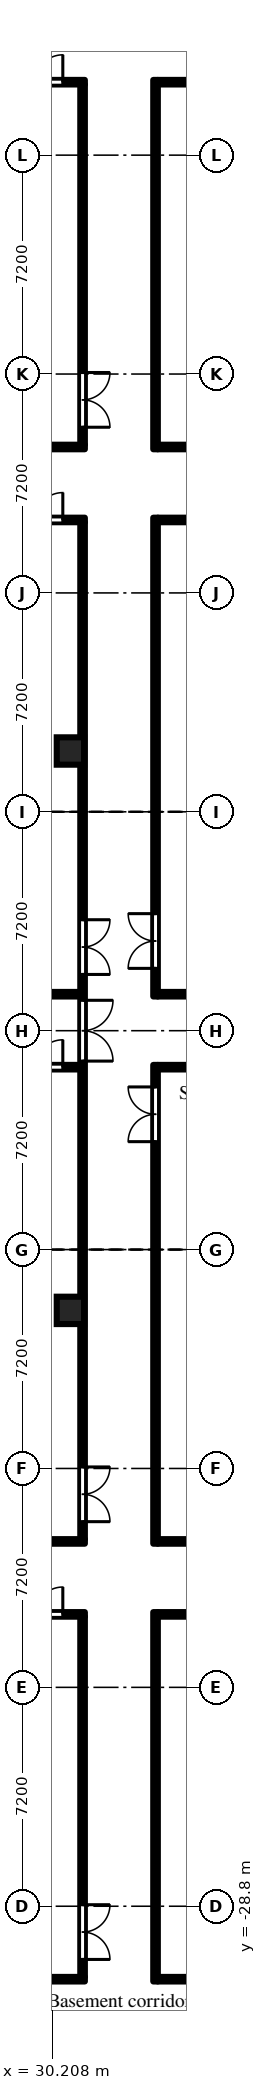
"""IFC4 building model, lengths in metres.
Left out: names, types, materials, properties, quantities, classifications, styles, units other than length and angle.
Written with IfcOpenShell. Run it as: python <this file> out.ifc"""

import sys

from ifc_helpers import new_model, si_unit, direction, frame, frame_2d, origin, origin_2d, place, context, subcontext, project, spatial, rectangle, extrude, element, fill, save


model = new_model("IFC4")
c1 = context("Model", 3, precision=1e-05, world=origin(), true_north=direction((0.0, 1.0)))
c2 = subcontext(c1, "Body", "Model", "MODEL_VIEW")
j1 = project(units=[si_unit("LENGTHUNIT", "METRE"), si_unit("PLANEANGLEUNIT", "RADIAN")], contexts=[c1])
p1 = place(None, origin())
s1 = spatial("IfcSite", under=j1, at=p1, CompositionType="ELEMENT")
p2 = place(p1, origin())
s2 = spatial("IfcBuilding", under=s1, at=p2, CompositionType="ELEMENT")
p3 = place(p2, frame((0.0, 0.0, -4.8)))
s3 = spatial("IfcBuildingStorey", under=s2, at=p3, CompositionType="ELEMENT", Elevation=-4.8)
for number, where, z_axis, x_axis in (
    (1, (30.8, -9.2, -0.5), (0.0, 0.0, 1.0), (1.0, 0.0, 0.0)),
    (2, (30.8, 9.2, -0.5), (0.0, 0.0, 1.0), (1.0, 0.0, 0.0)),
):
    element("IfcColumn", number, at=place(p3, frame(where, z_axis=z_axis, x_axis=x_axis)), inside=s3, PredefinedType="COLUMN", context=c2, shape_type="SweptSolid", body=[
        extrude(rectangle(XDim=0.9, YDim=0.9, at=origin_2d()), origin(), (0.0, 0.0, 1.0), 5.3),
    ])
p4 = place(p3, frame((18.675, -31.2, 0.0), z_axis=(0.0, 0.0, 1.0), x_axis=(1.0, 0.0, 0.0)))
e3 = element("IfcWall", 3, at=p4, inside=s3, PredefinedType="PARTITIONING", context=c2, shape_type="SweptSolid", body=[
    extrude(rectangle(XDim=12.6, YDim=0.15, at=frame_2d((6.3, 0.0))), origin(), (0.0, 0.0, 1.0), 4.35),
])
p5 = place(p4, frame((0.575, 0.0, 0.0)))
e4 = element("IfcOpeningElement", 4, at=p5, cuts=e3, PredefinedType="OPENING", context=c2, shape_type="SweptSolid", body=[
    extrude(rectangle(XDim=1.8, YDim=2.1, at=frame_2d((0.9, 1.05))), frame((0.0, 0.085, 0.0), z_axis=(0.0, -1.0, 0.0), x_axis=(1.0, 0.0, 0.0)), (0.0, 0.0, 1.0), 0.17),
])
p6 = place(p3, frame((18.675, -19.2, 0.0), z_axis=(0.0, 0.0, 1.0), x_axis=(1.0, 0.0, 0.0)))
e5 = element("IfcWall", 5, at=p6, inside=s3, PredefinedType="PARTITIONING", context=c2, shape_type="SweptSolid", body=[
    extrude(rectangle(XDim=12.6, YDim=0.15, at=frame_2d((6.3, 0.0))), origin(), (0.0, 0.0, 1.0), 4.35),
])
p7 = place(p6, frame((10.075, 0.0, 0.0)))
e6 = element("IfcOpeningElement", 6, at=p7, cuts=e5, PredefinedType="OPENING", context=c2, shape_type="SweptSolid", body=[
    extrude(rectangle(XDim=1.8, YDim=2.1, at=frame_2d((0.9, 1.05))), frame((0.0, 0.085, 0.0), z_axis=(0.0, -1.0, 0.0), x_axis=(1.0, 0.0, 0.0)), (0.0, 0.0, 1.0), 0.17),
])
p8 = place(p3, frame((18.675, -16.8, 0.0), z_axis=(0.0, 0.0, 1.0), x_axis=(1.0, 0.0, 0.0)))
e7 = element("IfcWall", 7, at=p8, inside=s3, PredefinedType="PARTITIONING", context=c2, shape_type="SweptSolid", body=[
    extrude(rectangle(XDim=12.6, YDim=0.15, at=frame_2d((6.3, 0.0))), origin(), (0.0, 0.0, 1.0), 4.35),
])
p9 = place(p8, frame((0.575, 0.0, 0.0)))
e8 = element("IfcOpeningElement", 8, at=p9, cuts=e7, PredefinedType="OPENING", context=c2, shape_type="SweptSolid", body=[
    extrude(rectangle(XDim=1.8, YDim=2.1, at=frame_2d((0.9, 1.05))), frame((0.0, 0.085, 0.0), z_axis=(0.0, -1.0, 0.0), x_axis=(1.0, 0.0, 0.0)), (0.0, 0.0, 1.0), 0.17),
])
p10 = place(p3, frame((18.675, 16.8, 0.0), z_axis=(0.0, 0.0, 1.0), x_axis=(1.0, 0.0, 0.0)))
e9 = element("IfcWall", 9, at=p10, inside=s3, PredefinedType="PARTITIONING", context=c2, shape_type="SweptSolid", body=[
    extrude(rectangle(XDim=12.6, YDim=0.15, at=frame_2d((6.3, 0.0))), origin(), (0.0, 0.0, 1.0), 4.35),
])
p11 = place(p10, frame((10.075, 0.0, 0.0)))
e10 = element("IfcOpeningElement", 10, at=p11, cuts=e9, PredefinedType="OPENING", context=c2, shape_type="SweptSolid", body=[
    extrude(rectangle(XDim=1.8, YDim=2.1, at=frame_2d((0.9, 1.05))), frame((0.0, 0.085, 0.0), z_axis=(0.0, -1.0, 0.0), x_axis=(1.0, 0.0, 0.0)), (0.0, 0.0, 1.0), 0.17),
])
p12 = place(p3, frame((18.675, 19.2, 0.0), z_axis=(0.0, 0.0, 1.0), x_axis=(1.0, 0.0, 0.0)))
e11 = element("IfcWall", 11, at=p12, inside=s3, PredefinedType="PARTITIONING", context=c2, shape_type="SweptSolid", body=[
    extrude(rectangle(XDim=12.6, YDim=0.15, at=frame_2d((6.3, 0.0))), origin(), (0.0, 0.0, 1.0), 4.35),
])
p13 = place(p12, frame((0.575, 0.0, 0.0)))
e12 = element("IfcOpeningElement", 12, at=p13, cuts=e11, PredefinedType="OPENING", context=c2, shape_type="SweptSolid", body=[
    extrude(rectangle(XDim=1.8, YDim=2.1, at=frame_2d((0.9, 1.05))), frame((0.0, 0.085, 0.0), z_axis=(0.0, -1.0, 0.0), x_axis=(1.0, 0.0, 0.0)), (0.0, 0.0, 1.0), 0.17),
])
p14 = place(p3, frame((18.675, 31.2, 0.0), z_axis=(0.0, 0.0, 1.0), x_axis=(1.0, 0.0, 0.0)))
e13 = element("IfcWall", 13, at=p14, inside=s3, PredefinedType="PARTITIONING", context=c2, shape_type="SweptSolid", body=[
    extrude(rectangle(XDim=12.6, YDim=0.15, at=frame_2d((6.3, 0.0))), origin(), (0.0, 0.0, 1.0), 4.35),
])
p15 = place(p14, frame((10.075, 0.0, 0.0)))
e14 = element("IfcOpeningElement", 14, at=p15, cuts=e13, PredefinedType="OPENING", context=c2, shape_type="SweptSolid", body=[
    extrude(rectangle(XDim=1.8, YDim=2.1, at=frame_2d((0.9, 1.05))), frame((0.0, 0.085, 0.0), z_axis=(0.0, -1.0, 0.0), x_axis=(1.0, 0.0, 0.0)), (0.0, 0.0, 1.0), 0.17),
])
p16 = place(p3, frame((21.6, -1.2, 0.0), z_axis=(0.0, 0.0, 1.0), x_axis=(1.0, 0.0, 0.0)))
e15 = element("IfcWall", 15, at=p16, inside=s3, PredefinedType="PARTITIONING", context=c2, shape_type="SweptSolid", body=[
    extrude(rectangle(XDim=9.525, YDim=0.15, at=frame_2d((4.762, 0.0))), origin(), (0.0, 0.0, 1.0), 4.35),
])
p17 = place(p16, frame((0.85, 0.0, 0.0)))
e16 = element("IfcOpeningElement", 16, at=p17, cuts=e15, PredefinedType="OPENING", context=c2, shape_type="SweptSolid", body=[
    extrude(rectangle(XDim=1.8, YDim=2.1, at=frame_2d((0.9, 1.05))), frame((0.0, 0.085, 0.0), z_axis=(0.0, -1.0, 0.0), x_axis=(1.0, 0.0, 0.0)), (0.0, 0.0, 1.0), 0.17),
])
p18 = place(p16, frame((7.15, 0.0, 0.0)))
e17 = element("IfcOpeningElement", 17, at=p18, cuts=e15, PredefinedType="OPENING", context=c2, shape_type="SweptSolid", body=[
    extrude(rectangle(XDim=1.8, YDim=2.1, at=frame_2d((0.9, 1.05))), frame((0.0, 0.085, 0.0), z_axis=(0.0, -1.0, 0.0), x_axis=(1.0, 0.0, 0.0)), (0.0, 0.0, 1.0), 0.17),
])
p19 = place(p3, frame((21.6, 1.2, 0.0), z_axis=(0.0, 0.0, 1.0), x_axis=(1.0, 0.0, 0.0)))
e18 = element("IfcWall", 18, at=p19, inside=s3, PredefinedType="PARTITIONING", context=c2, shape_type="SweptSolid", body=[
    extrude(rectangle(XDim=9.525, YDim=0.15, at=frame_2d((4.762, 0.0))), origin(), (0.0, 0.0, 1.0), 4.35),
])
p20 = place(p19, frame((0.65, 0.0, 0.0)))
e19 = element("IfcOpeningElement", 19, at=p20, cuts=e18, PredefinedType="OPENING", context=c2, shape_type="SweptSolid", body=[
    extrude(rectangle(XDim=1.8, YDim=2.1, at=frame_2d((0.9, 1.05))), frame((0.0, 0.085, 0.0), z_axis=(0.0, -1.0, 0.0), x_axis=(1.0, 0.0, 0.0)), (0.0, 0.0, 1.0), 0.17),
])
p21 = place(p3, frame((31.2, -31.125, 0.0), z_axis=(0.0, 0.0, 1.0), x_axis=(0.0, 1.0, 0.0)))
e20 = element("IfcWall", 20, at=p21, inside=s3, PredefinedType="PARTITIONING", context=c2, shape_type="SweptSolid", body=[
    extrude(rectangle(XDim=11.85, YDim=0.15, at=frame_2d((5.925, 0.0))), origin(), (0.0, 0.0, 1.0), 4.35),
])
p22 = place(p21, frame((0.575, 0.0, 0.0)))
e21 = element("IfcOpeningElement", 21, at=p22, cuts=e20, PredefinedType="OPENING", context=c2, shape_type="SweptSolid", body=[
    extrude(rectangle(XDim=1.8, YDim=2.1, at=frame_2d((0.9, 1.05))), frame((0.0, 0.085, 0.0), z_axis=(0.0, -1.0, 0.0), x_axis=(1.0, 0.0, 0.0)), (0.0, 0.0, 1.0), 0.17),
])
p23 = place(p3, frame((31.2, -16.725, 0.0), z_axis=(0.0, 0.0, 1.0), x_axis=(0.0, 1.0, 0.0)))
e22 = element("IfcWall", 22, at=p23, inside=s3, PredefinedType="PARTITIONING", context=c2, shape_type="SweptSolid", body=[
    extrude(rectangle(XDim=33.45, YDim=0.15, at=frame_2d((16.725, 0.0))), origin(), (0.0, 0.0, 1.0), 4.35),
])
p24 = place(p23, frame((15.725, 0.0, 0.0)))
e23 = element("IfcOpeningElement", 23, at=p24, cuts=e22, PredefinedType="OPENING", context=c2, shape_type="SweptSolid", body=[
    extrude(rectangle(XDim=2.0, YDim=2.1, at=frame_2d((1.0, 1.05))), frame((0.0, 0.085, 0.0), z_axis=(0.0, -1.0, 0.0), x_axis=(1.0, 0.0, 0.0)), (0.0, 0.0, 1.0), 0.17),
])
p25 = place(p23, frame((18.575, 0.0, 0.0)))
e24 = element("IfcOpeningElement", 24, at=p25, cuts=e22, PredefinedType="OPENING", context=c2, shape_type="SweptSolid", body=[
    extrude(rectangle(XDim=1.8, YDim=2.1, at=frame_2d((0.9, 1.05))), frame((0.0, 0.085, 0.0), z_axis=(0.0, -1.0, 0.0), x_axis=(1.0, 0.0, 0.0)), (0.0, 0.0, 1.0), 0.17),
])
p26 = place(p23, frame((0.575, 0.0, 0.0)))
e25 = element("IfcOpeningElement", 25, at=p26, cuts=e22, PredefinedType="OPENING", context=c2, shape_type="SweptSolid", body=[
    extrude(rectangle(XDim=1.8, YDim=2.1, at=frame_2d((0.9, 1.05))), frame((0.0, 0.085, 0.0), z_axis=(0.0, -1.0, 0.0), x_axis=(1.0, 0.0, 0.0)), (0.0, 0.0, 1.0), 0.17),
])
p27 = place(p3, frame((31.2, 19.275, 0.0), z_axis=(0.0, 0.0, 1.0), x_axis=(0.0, 1.0, 0.0)))
e26 = element("IfcWall", 26, at=p27, inside=s3, PredefinedType="PARTITIONING", context=c2, shape_type="SweptSolid", body=[
    extrude(rectangle(XDim=11.85, YDim=0.15, at=frame_2d((5.925, 0.0))), origin(), (0.0, 0.0, 1.0), 4.35),
])
p28 = place(p27, frame((0.575, 0.0, 0.0)))
e27 = element("IfcOpeningElement", 27, at=p28, cuts=e26, PredefinedType="OPENING", context=c2, shape_type="SweptSolid", body=[
    extrude(rectangle(XDim=1.8, YDim=2.1, at=frame_2d((0.9, 1.05))), frame((0.0, 0.085, 0.0), z_axis=(0.0, -1.0, 0.0), x_axis=(1.0, 0.0, 0.0)), (0.0, 0.0, 1.0), 0.17),
])
p29 = place(p3, frame((33.6, -31.275, 0.0), z_axis=(0.0, 0.0, 1.0), x_axis=(0.0, 1.0, 0.0)))
e28 = element("IfcWall", 28, at=p29, inside=s3, PredefinedType="PARTITIONING", context=c2, shape_type="SweptSolid", body=[
    extrude(rectangle(XDim=12.15, YDim=0.15, at=frame_2d((6.075, 0.0))), origin(), (0.0, 0.0, 1.0), 4.35),
])
p30 = place(p3, frame((33.675, -31.2, 0.0), z_axis=(0.0, 0.0, 1.0), x_axis=(1.0, 0.0, 0.0)))
e29 = element("IfcWall", 29, at=p30, inside=s3, PredefinedType="PARTITIONING", context=c2, shape_type="SweptSolid", body=[
    extrude(rectangle(XDim=7.7, YDim=0.15, at=frame_2d((3.85, 0.0))), origin(), (0.0, 0.0, 1.0), 4.35),
])
p31 = place(p30, frame((2.375, 0.0, 0.0)))
e30 = element("IfcOpeningElement", 30, at=p31, cuts=e29, PredefinedType="OPENING", context=c2, shape_type="SweptSolid", body=[
    extrude(rectangle(XDim=1.8, YDim=2.1, at=frame_2d((0.9, 1.05))), frame((0.0, 0.085, 0.0), z_axis=(0.0, -1.0, 0.0), x_axis=(1.0, 0.0, 0.0)), (0.0, 0.0, 1.0), 0.17),
])
p32 = place(p3, frame((33.675, -19.2, 0.0), z_axis=(0.0, 0.0, 1.0), x_axis=(1.0, 0.0, 0.0)))
e31 = element("IfcWall", 31, at=p32, inside=s3, PredefinedType="PARTITIONING", context=c2, shape_type="SweptSolid", body=[
    extrude(rectangle(XDim=7.7, YDim=0.15, at=frame_2d((3.85, 0.0))), origin(), (0.0, 0.0, 1.0), 4.35),
])
p33 = place(p32, frame((3.375, 0.0, 0.0)))
e32 = element("IfcOpeningElement", 32, at=p33, cuts=e31, PredefinedType="OPENING", context=c2, shape_type="SweptSolid", body=[
    extrude(rectangle(XDim=1.8, YDim=2.1, at=frame_2d((0.9, 1.05))), frame((0.0, 0.085, 0.0), z_axis=(0.0, -1.0, 0.0), x_axis=(1.0, 0.0, 0.0)), (0.0, 0.0, 1.0), 0.17),
])
p34 = place(p3, frame((33.6, -16.875, 0.0), z_axis=(0.0, 0.0, 1.0), x_axis=(0.0, 1.0, 0.0)))
e33 = element("IfcWall", 33, at=p34, inside=s3, PredefinedType="PARTITIONING", context=c2, shape_type="SweptSolid", body=[
    extrude(rectangle(XDim=15.75, YDim=0.15, at=frame_2d((7.875, 0.0))), origin(), (0.0, 0.0, 1.0), 4.35),
])
p35 = place(p34, frame((13.225, 0.0, 0.0)))
e34 = element("IfcOpeningElement", 34, at=p35, cuts=e33, PredefinedType="OPENING", context=c2, shape_type="SweptSolid", body=[
    extrude(rectangle(XDim=1.8, YDim=2.1, at=frame_2d((0.9, 1.05))), frame((0.0, 0.085, 0.0), z_axis=(0.0, -1.0, 0.0), x_axis=(1.0, 0.0, 0.0)), (0.0, 0.0, 1.0), 0.17),
])
p36 = place(p3, frame((33.675, -16.8, 0.0), z_axis=(0.0, 0.0, 1.0), x_axis=(1.0, 0.0, 0.0)))
e35 = element("IfcWall", 35, at=p36, inside=s3, PredefinedType="PARTITIONING", context=c2, shape_type="SweptSolid", body=[
    extrude(rectangle(XDim=7.7, YDim=0.15, at=frame_2d((3.85, 0.0))), origin(), (0.0, 0.0, 1.0), 4.35),
])
p37 = place(p36, frame((2.375, 0.0, 0.0)))
e36 = element("IfcOpeningElement", 36, at=p37, cuts=e35, PredefinedType="OPENING", context=c2, shape_type="SweptSolid", body=[
    extrude(rectangle(XDim=1.8, YDim=2.1, at=frame_2d((0.9, 1.05))), frame((0.0, 0.085, 0.0), z_axis=(0.0, -1.0, 0.0), x_axis=(1.0, 0.0, 0.0)), (0.0, 0.0, 1.0), 0.17),
])
p38 = place(p3, frame((33.675, -1.2, 0.0), z_axis=(0.0, 0.0, 1.0), x_axis=(1.0, 0.0, 0.0)))
e37 = element("IfcWall", 37, at=p38, inside=s3, PredefinedType="PARTITIONING", context=c2, shape_type="SweptSolid", body=[
    extrude(rectangle(XDim=2.825, YDim=0.15, at=frame_2d((1.413, 0.0))), origin(), (0.0, 0.0, 1.0), 4.35),
])
p39 = place(p3, frame((33.6, 1.125, 0.0), z_axis=(0.0, 0.0, 1.0), x_axis=(0.0, 1.0, 0.0)))
e38 = element("IfcWall", 38, at=p39, inside=s3, PredefinedType="PARTITIONING", context=c2, shape_type="SweptSolid", body=[
    extrude(rectangle(XDim=15.75, YDim=0.15, at=frame_2d((7.875, 0.0))), origin(), (0.0, 0.0, 1.0), 4.35),
])
p40 = place(p39, frame((0.925, 0.0, 0.0)))
e39 = element("IfcOpeningElement", 39, at=p40, cuts=e38, PredefinedType="OPENING", context=c2, shape_type="SweptSolid", body=[
    extrude(rectangle(XDim=1.8, YDim=2.1, at=frame_2d((0.9, 1.05))), frame((0.0, 0.085, 0.0), z_axis=(0.0, -1.0, 0.0), x_axis=(1.0, 0.0, 0.0)), (0.0, 0.0, 1.0), 0.17),
])
p41 = place(p3, frame((33.675, 1.2, 0.0), z_axis=(0.0, 0.0, 1.0), x_axis=(1.0, 0.0, 0.0)))
e40 = element("IfcWall", 40, at=p41, inside=s3, PredefinedType="PARTITIONING", context=c2, shape_type="SweptSolid", body=[
    extrude(rectangle(XDim=2.825, YDim=0.15, at=frame_2d((1.413, 0.0))), origin(), (0.0, 0.0, 1.0), 4.35),
])
p42 = place(p3, frame((33.675, 16.8, 0.0), z_axis=(0.0, 0.0, 1.0), x_axis=(1.0, 0.0, 0.0)))
e41 = element("IfcWall", 41, at=p42, inside=s3, PredefinedType="PARTITIONING", context=c2, shape_type="SweptSolid", body=[
    extrude(rectangle(XDim=7.7, YDim=0.15, at=frame_2d((3.85, 0.0))), origin(), (0.0, 0.0, 1.0), 4.35),
])
p43 = place(p42, frame((3.375, 0.0, 0.0)))
e42 = element("IfcOpeningElement", 42, at=p43, cuts=e41, PredefinedType="OPENING", context=c2, shape_type="SweptSolid", body=[
    extrude(rectangle(XDim=1.8, YDim=2.1, at=frame_2d((0.9, 1.05))), frame((0.0, 0.085, 0.0), z_axis=(0.0, -1.0, 0.0), x_axis=(1.0, 0.0, 0.0)), (0.0, 0.0, 1.0), 0.17),
])
p44 = place(p3, frame((33.6, 19.125, 0.0), z_axis=(0.0, 0.0, 1.0), x_axis=(0.0, 1.0, 0.0)))
e43 = element("IfcWall", 43, at=p44, inside=s3, PredefinedType="PARTITIONING", context=c2, shape_type="SweptSolid", body=[
    extrude(rectangle(XDim=12.15, YDim=0.15, at=frame_2d((6.075, 0.0))), origin(), (0.0, 0.0, 1.0), 4.35),
])
p45 = place(p3, frame((33.675, 19.2, 0.0), z_axis=(0.0, 0.0, 1.0), x_axis=(1.0, 0.0, 0.0)))
e44 = element("IfcWall", 44, at=p45, inside=s3, PredefinedType="PARTITIONING", context=c2, shape_type="SweptSolid", body=[
    extrude(rectangle(XDim=7.7, YDim=0.15, at=frame_2d((3.85, 0.0))), origin(), (0.0, 0.0, 1.0), 4.35),
])
p46 = place(p45, frame((2.375, 0.0, 0.0)))
e45 = element("IfcOpeningElement", 45, at=p46, cuts=e44, PredefinedType="OPENING", context=c2, shape_type="SweptSolid", body=[
    extrude(rectangle(XDim=1.8, YDim=2.1, at=frame_2d((0.9, 1.05))), frame((0.0, 0.085, 0.0), z_axis=(0.0, -1.0, 0.0), x_axis=(1.0, 0.0, 0.0)), (0.0, 0.0, 1.0), 0.17),
])
p47 = place(p3, frame((33.675, 31.2, 0.0), z_axis=(0.0, 0.0, 1.0), x_axis=(1.0, 0.0, 0.0)))
e46 = element("IfcWall", 46, at=p47, inside=s3, PredefinedType="PARTITIONING", context=c2, shape_type="SweptSolid", body=[
    extrude(rectangle(XDim=7.7, YDim=0.15, at=frame_2d((3.85, 0.0))), origin(), (0.0, 0.0, 1.0), 4.35),
])
p48 = place(p47, frame((3.375, 0.0, 0.0)))
e47 = element("IfcOpeningElement", 47, at=p48, cuts=e46, PredefinedType="OPENING", context=c2, shape_type="SweptSolid", body=[
    extrude(rectangle(XDim=1.8, YDim=2.1, at=frame_2d((0.9, 1.05))), frame((0.0, 0.085, 0.0), z_axis=(0.0, -1.0, 0.0), x_axis=(1.0, 0.0, 0.0)), (0.0, 0.0, 1.0), 0.17),
])
p49 = place(p24, frame((2.0, 0.0, 0.0), z_axis=(0.0, 0.0, 1.0), x_axis=(-1.0, 0.0, 0.0)))
e48 = element("IfcDoor", 48, at=p49, inside=s3, OperationType="DOUBLE_DOOR_DOUBLE_SWING", PredefinedType="DOOR", context=c2, shape_type="SweptSolid", body=[
    extrude(rectangle(XDim=2.0, YDim=2.1, at=frame_2d((1.0, 1.05))), frame((0.0, 0.025, 0.0), z_axis=(0.0, -1.0, 0.0), x_axis=(1.0, 0.0, 0.0)), (0.0, 0.0, 1.0), 0.05),
])
fill(e23, e48)
p50 = place(p11, origin())
e49 = element("IfcDoor", 49, at=p50, inside=s3, OperationType="DOUBLE_DOOR_DOUBLE_SWING", PredefinedType="DOOR", context=c2, shape_type="SweptSolid", body=[
    extrude(rectangle(XDim=1.8, YDim=2.1, at=frame_2d((0.9, 1.05))), frame((0.0, 0.025, 0.0), z_axis=(0.0, -1.0, 0.0), x_axis=(1.0, 0.0, 0.0)), (0.0, 0.0, 1.0), 0.05),
])
fill(e10, e49)
p51 = place(p25, frame((1.8, 0.0, 0.0), z_axis=(0.0, 0.0, 1.0), x_axis=(-1.0, 0.0, 0.0)))
e50 = element("IfcDoor", 50, at=p51, inside=s3, OperationType="DOUBLE_DOOR_DOUBLE_SWING", PredefinedType="DOOR", context=c2, shape_type="SweptSolid", body=[
    extrude(rectangle(XDim=1.8, YDim=2.1, at=frame_2d((0.9, 1.05))), frame((0.0, 0.025, 0.0), z_axis=(0.0, -1.0, 0.0), x_axis=(1.0, 0.0, 0.0)), (0.0, 0.0, 1.0), 0.05),
])
fill(e24, e50)
p52 = place(p15, origin())
e51 = element("IfcDoor", 51, at=p52, inside=s3, OperationType="DOUBLE_DOOR_DOUBLE_SWING", PredefinedType="DOOR", context=c2, shape_type="SweptSolid", body=[
    extrude(rectangle(XDim=1.8, YDim=2.1, at=frame_2d((0.9, 1.05))), frame((0.0, 0.025, 0.0), z_axis=(0.0, -1.0, 0.0), x_axis=(1.0, 0.0, 0.0)), (0.0, 0.0, 1.0), 0.05),
])
fill(e14, e51)
p53 = place(p28, frame((1.8, 0.0, 0.0), z_axis=(0.0, 0.0, 1.0), x_axis=(-1.0, 0.0, 0.0)))
e52 = element("IfcDoor", 52, at=p53, inside=s3, OperationType="DOUBLE_DOOR_DOUBLE_SWING", PredefinedType="DOOR", context=c2, shape_type="SweptSolid", body=[
    extrude(rectangle(XDim=1.8, YDim=2.1, at=frame_2d((0.9, 1.05))), frame((0.0, 0.025, 0.0), z_axis=(0.0, -1.0, 0.0), x_axis=(1.0, 0.0, 0.0)), (0.0, 0.0, 1.0), 0.05),
])
fill(e27, e52)
p54 = place(p18, origin())
e53 = element("IfcDoor", 53, at=p54, inside=s3, OperationType="DOUBLE_DOOR_DOUBLE_SWING", PredefinedType="DOOR", context=c2, shape_type="SweptSolid", body=[
    extrude(rectangle(XDim=1.8, YDim=2.1, at=frame_2d((0.9, 1.05))), frame((0.0, 0.025, 0.0), z_axis=(0.0, -1.0, 0.0), x_axis=(1.0, 0.0, 0.0)), (0.0, 0.0, 1.0), 0.05),
])
fill(e17, e53)
p55 = place(p26, frame((1.8, 0.0, 0.0), z_axis=(0.0, 0.0, 1.0), x_axis=(-1.0, 0.0, 0.0)))
e54 = element("IfcDoor", 54, at=p55, inside=s3, OperationType="DOUBLE_DOOR_DOUBLE_SWING", PredefinedType="DOOR", context=c2, shape_type="SweptSolid", body=[
    extrude(rectangle(XDim=1.8, YDim=2.1, at=frame_2d((0.9, 1.05))), frame((0.0, 0.025, 0.0), z_axis=(0.0, -1.0, 0.0), x_axis=(1.0, 0.0, 0.0)), (0.0, 0.0, 1.0), 0.05),
])
fill(e25, e54)
p56 = place(p7, origin())
e55 = element("IfcDoor", 55, at=p56, inside=s3, OperationType="DOUBLE_DOOR_DOUBLE_SWING", PredefinedType="DOOR", context=c2, shape_type="SweptSolid", body=[
    extrude(rectangle(XDim=1.8, YDim=2.1, at=frame_2d((0.9, 1.05))), frame((0.0, 0.025, 0.0), z_axis=(0.0, -1.0, 0.0), x_axis=(1.0, 0.0, 0.0)), (0.0, 0.0, 1.0), 0.05),
])
fill(e6, e55)
p57 = place(p22, frame((1.8, 0.0, 0.0), z_axis=(0.0, 0.0, 1.0), x_axis=(-1.0, 0.0, 0.0)))
e56 = element("IfcDoor", 56, at=p57, inside=s3, OperationType="DOUBLE_DOOR_DOUBLE_SWING", PredefinedType="DOOR", context=c2, shape_type="SweptSolid", body=[
    extrude(rectangle(XDim=1.8, YDim=2.1, at=frame_2d((0.9, 1.05))), frame((0.0, 0.025, 0.0), z_axis=(0.0, -1.0, 0.0), x_axis=(1.0, 0.0, 0.0)), (0.0, 0.0, 1.0), 0.05),
])
fill(e21, e56)
p58 = place(p40, origin())
e57 = element("IfcDoor", 57, at=p58, inside=s3, OperationType="DOUBLE_DOOR_DOUBLE_SWING", PredefinedType="DOOR", context=c2, shape_type="SweptSolid", body=[
    extrude(rectangle(XDim=1.8, YDim=2.1, at=frame_2d((0.9, 1.05))), frame((0.0, 0.025, 0.0), z_axis=(0.0, -1.0, 0.0), x_axis=(1.0, 0.0, 0.0)), (0.0, 0.0, 1.0), 0.05),
])
fill(e39, e57)
p59 = place(p35, origin())
e58 = element("IfcDoor", 58, at=p59, inside=s3, OperationType="DOUBLE_DOOR_DOUBLE_SWING", PredefinedType="DOOR", context=c2, shape_type="SweptSolid", body=[
    extrude(rectangle(XDim=1.8, YDim=2.1, at=frame_2d((0.9, 1.05))), frame((0.0, 0.025, 0.0), z_axis=(0.0, -1.0, 0.0), x_axis=(1.0, 0.0, 0.0)), (0.0, 0.0, 1.0), 0.05),
])
fill(e34, e58)
save(model, sys.argv[1])
